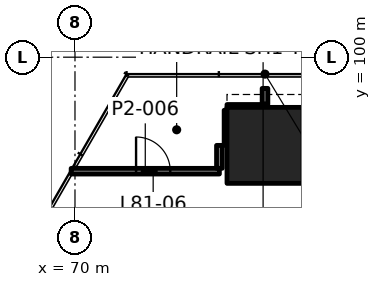
"""IFC4 building model, lengths in metres.
Left out: names, types, materials, properties, quantities, classifications, styles, units other than length and angle.
Written with IfcOpenShell. Run it as: python <this file> out.ifc"""

import sys

from ifc_helpers import new_model, si_unit, direction, frame, frame_2d, origin, origin_2d, place, context, subcontext, project, spatial, rectangle, extrude, element, fill, save


model = new_model("IFC4")
c1 = context("Model", 3, precision=1e-05, world=origin(), true_north=direction((0.0, 1.0)))
c2 = subcontext(c1, "Body", "Model", "MODEL_VIEW")
j1 = project(units=[si_unit("LENGTHUNIT", "METRE"), si_unit("PLANEANGLEUNIT", "RADIAN")], contexts=[c1])
p1 = place(None, origin())
s1 = spatial("IfcSite", under=j1, at=p1, CompositionType="ELEMENT")
p2 = place(p1, origin())
s2 = spatial("IfcBuilding", under=s1, at=p2, CompositionType="ELEMENT")
p3 = place(p2, frame((0.0, 0.0, 331.6)))
s3 = spatial("IfcBuildingStorey", under=s2, at=p3, CompositionType="ELEMENT", Elevation=331.6)
p4 = place(p3, frame((75.0, 97.68, 0.0), z_axis=(0.0, 0.0, 1.0), x_axis=(-1.0, 0.0, 0.0)))
e1 = element("IfcColumn", 1, at=p4, inside=s3, PredefinedType="COLUMN", context=c2, shape_type="SweptSolid", body=[
    extrude(rectangle(XDim=2.0, YDim=2.0, at=origin_2d()), origin(), (0.0, 0.0, 1.0), 4.0),
])
p5 = place(p3, frame((69.899, 97.0, 0.0), z_axis=(0.0, 0.0, 1.0), x_axis=(1.0, 0.0, 0.0)))
e2 = element("IfcWall", 2, at=p5, inside=s3, PredefinedType="PARTITIONING", context=c2, shape_type="SweptSolid", body=[
    extrude(rectangle(XDim=3.901, YDim=0.15, at=frame_2d((1.95, 0.0))), origin(), (0.0, 0.0, 1.0), 3.1),
])
p6 = place(p5, frame((1.708, 0.0, 0.0)))
e3 = element("IfcOpeningElement", 3, at=p6, cuts=e2, PredefinedType="OPENING", context=c2, shape_type="SweptSolid", body=[
    extrude(rectangle(XDim=0.9, YDim=2.1, at=frame_2d((0.45, 1.05))), frame((0.0, 0.085, 0.0), z_axis=(0.0, -1.0, 0.0), x_axis=(1.0, 0.0, 0.0)), (0.0, 0.0, 1.0), 0.17),
])
p7 = place(p3, frame((74.0, 98.68, 0.0), z_axis=(0.0, 0.0, 1.0), x_axis=(1.0, 0.0, 0.0)))
e4 = element("IfcWall", 4, at=p7, inside=s3, PredefinedType="PARTITIONING", context=c2, shape_type="SweptSolid", body=[
    extrude(rectangle(XDim=1.0, YDim=0.15, at=frame_2d((0.5, 0.0))), origin(), (0.0, 0.0, 1.0), 3.1),
])
p8 = place(p3, frame((75.0, 98.765, 0.0), z_axis=(0.0, 0.0, 1.0), x_axis=(0.0, 1.0, 0.0)))
e5 = element("IfcWall", 5, at=p8, inside=s3, PredefinedType="PARTITIONING", context=c2, shape_type="SweptSolid", body=[
    extrude(rectangle(XDim=0.415, YDim=0.15, at=frame_2d((0.208, 0.0))), origin(), (0.0, 0.0, 1.0), 3.1),
])
p9 = place(p3, frame((74.0, 97.68, 0.0), z_axis=(0.0, 0.0, 1.0), x_axis=(0.0, 1.0, 0.0)))
e6 = element("IfcWall", 6, at=p9, inside=s3, PredefinedType="PARTITIONING", context=c2, shape_type="SweptSolid", body=[
    extrude(rectangle(XDim=0.925, YDim=0.15, at=frame_2d((0.462, 0.0))), origin(), (0.0, 0.0, 1.0), 3.1),
])
p10 = place(p3, frame((73.8, 97.075, 0.0), z_axis=(0.0, 0.0, 1.0), x_axis=(0.0, 1.0, 0.0)))
e7 = element("IfcWall", 7, at=p10, inside=s3, PredefinedType="PARTITIONING", context=c2, shape_type="SweptSolid", body=[
    extrude(rectangle(XDim=0.605, YDim=0.15, at=frame_2d((0.302, 0.0))), origin(), (0.0, 0.0, 1.0), 3.1),
])
p11 = place(p6, origin())
e8 = element("IfcDoor", 8, at=p11, inside=s3, OperationType="SINGLE_SWING_RIGHT", PredefinedType="DOOR", context=c2, shape_type="SweptSolid", body=[
    extrude(rectangle(XDim=0.9, YDim=2.1, at=frame_2d((0.45, 1.05))), frame((0.0, 0.025, 0.0), z_axis=(0.0, -1.0, 0.0), x_axis=(1.0, 0.0, 0.0)), (0.0, 0.0, 1.0), 0.05),
])
fill(e3, e8)
save(model, sys.argv[1])
